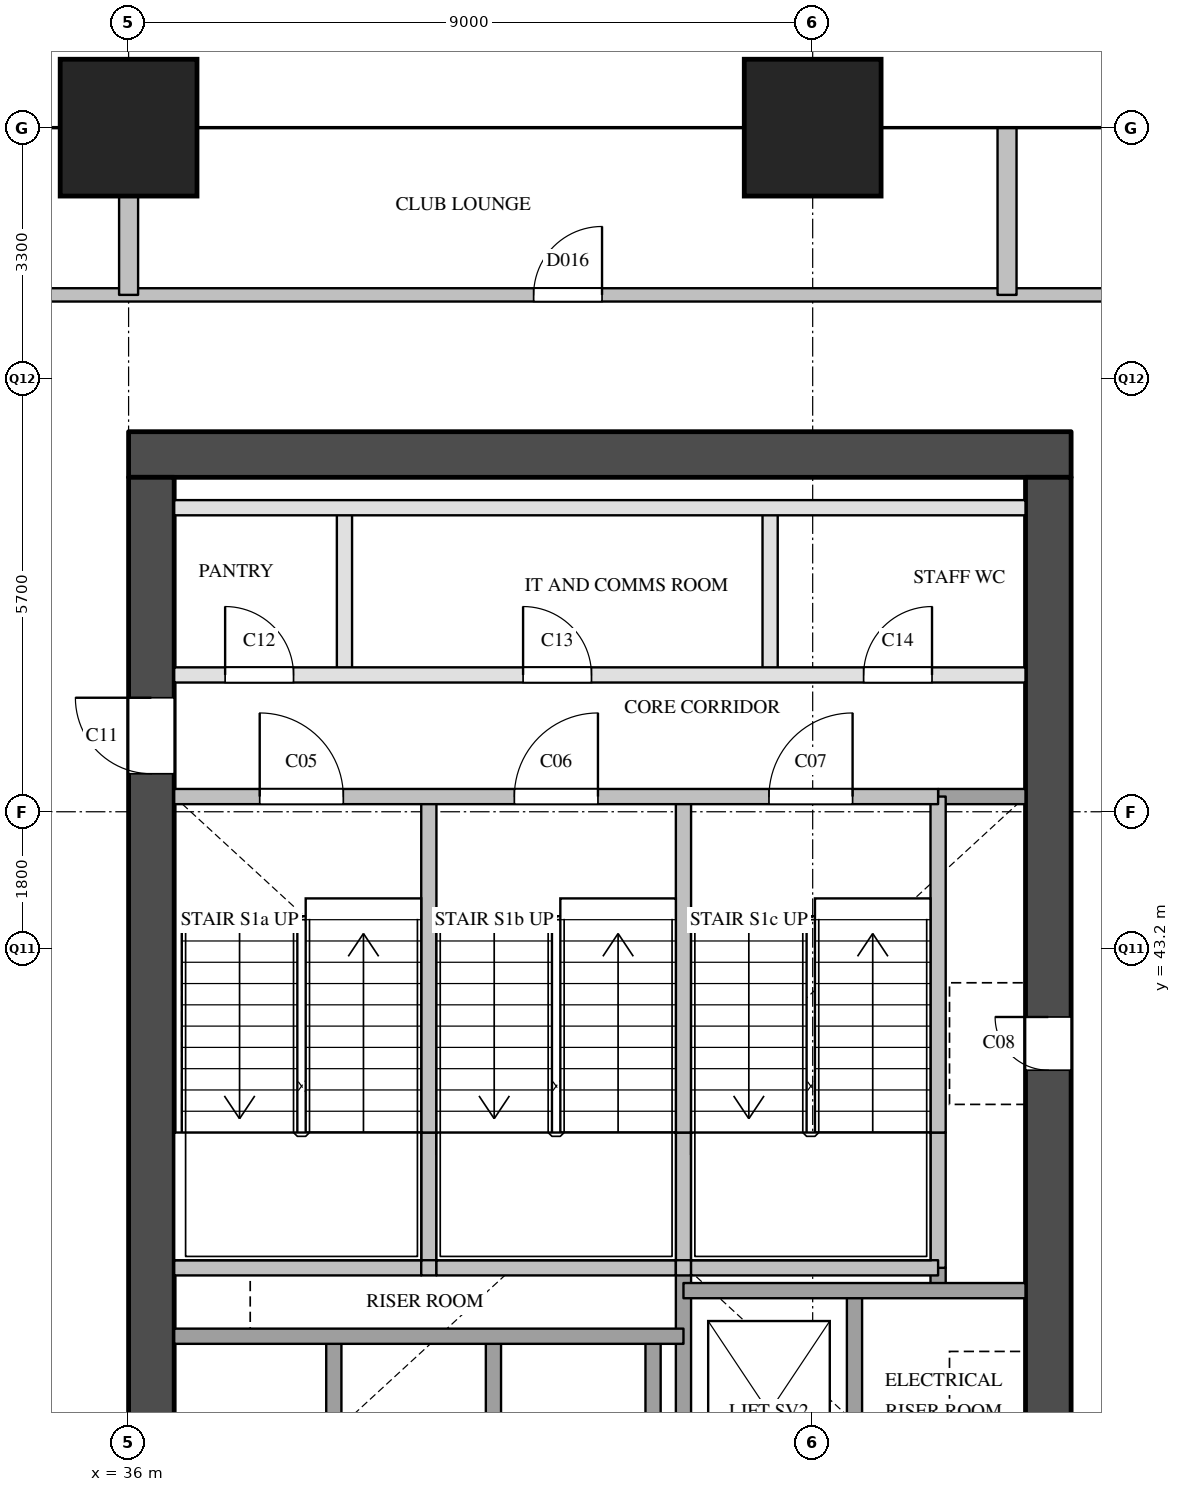
"""IFC4 building model, lengths in metres.
Left out: names, types, materials, properties, quantities, classifications, styles, units other than length and angle.
Written with IfcOpenShell. Run it as: python <this file> out.ifc"""

import sys

from ifc_helpers import new_model, si_unit, direction, frame, frame_2d, origin, origin_2d, place, context, subcontext, project, spatial, rectangle, extrude, element, fill, save


model = new_model("IFC4")
c1 = context("Model", 3, precision=1e-05, world=origin(), true_north=direction((0.0, 1.0)))
c2 = subcontext(c1, "Body", "Model", "MODEL_VIEW")
j1 = project(units=[si_unit("LENGTHUNIT", "METRE"), si_unit("PLANEANGLEUNIT", "RADIAN")], contexts=[c1])
p1 = place(None, origin())
s1 = spatial("IfcSite", under=j1, at=p1, CompositionType="ELEMENT")
p2 = place(p1, origin())
s2 = spatial("IfcBuilding", under=s1, at=p2, CompositionType="ELEMENT")
p3 = place(p2, frame((0.0, 0.0, 77.8)))
s3 = spatial("IfcBuildingStorey", under=s2, at=p3, CompositionType="ELEMENT", Elevation=77.8)
for number, where, z_axis, x_axis in (
    (1, (36.0, 54.0, 0.0), (0.0, 0.0, 1.0), (1.0, 0.0, 0.0)),
    (2, (45.0, 54.0, 0.0), (0.0, 0.0, 1.0), (1.0, 0.0, 0.0)),
):
    element("IfcColumn", number, at=place(p3, frame(where, z_axis=z_axis, x_axis=x_axis)), inside=s3, PredefinedType="COLUMN", context=c2, shape_type="SweptSolid", body=[
        extrude(rectangle(XDim=1.8, YDim=1.8, at=origin_2d()), origin(), (0.0, 0.0, 1.0), 3.8),
    ])
p4 = place(p3, frame((36.0, 49.7, 0.0), z_axis=(0.0, 0.0, 1.0), x_axis=(1.0, 0.0, 0.0)))
e3 = element("IfcWall", 3, at=p4, inside=s3, PredefinedType="SHEAR", context=c2, shape_type="SweptSolid", body=[
    extrude(rectangle(XDim=12.4, YDim=0.6, at=frame_2d((6.2, 0.0))), origin(), (0.0, 0.0, 1.0), 3.5),
])
p5 = place(p3, frame((36.3, 29.1, 0.0), z_axis=(0.0, 0.0, 1.0), x_axis=(0.0, 1.0, 0.0)))
e4 = element("IfcWall", 4, at=p5, inside=s3, PredefinedType="SHEAR", context=c2, shape_type="SweptSolid", body=[
    extrude(rectangle(XDim=20.3, YDim=0.6, at=frame_2d((10.15, 0.0))), origin(), (0.0, 0.0, 1.0), 3.5),
])
p6 = place(p5, frame((3.6, 0.0, 0.0)))
e5 = element("IfcOpeningElement", 5, at=p6, cuts=e4, PredefinedType="OPENING", context=c2, shape_type="SweptSolid", body=[
    extrude(rectangle(XDim=1.8, YDim=2.1, at=frame_2d((0.9, 1.05))), frame((0.0, 0.31, 0.0), z_axis=(0.0, -1.0, 0.0), x_axis=(1.0, 0.0, 0.0)), (0.0, 0.0, 1.0), 0.62),
])
p7 = place(p5, frame((16.4, 0.0, 0.0)))
e6 = element("IfcOpeningElement", 6, at=p7, cuts=e4, PredefinedType="OPENING", context=c2, shape_type="SweptSolid", body=[
    extrude(rectangle(XDim=1.0, YDim=2.1, at=frame_2d((0.5, 1.05))), frame((0.0, 0.31, 0.0), z_axis=(0.0, -1.0, 0.0), x_axis=(1.0, 0.0, 0.0)), (0.0, 0.0, 1.0), 0.62),
])
p8 = place(p3, frame((48.1, 29.1, 0.0), z_axis=(0.0, 0.0, 1.0), x_axis=(0.0, 1.0, 0.0)))
e7 = element("IfcWall", 7, at=p8, inside=s3, PredefinedType="SHEAR", context=c2, shape_type="SweptSolid", body=[
    extrude(rectangle(XDim=20.3, YDim=0.6, at=frame_2d((10.15, 0.0))), origin(), (0.0, 0.0, 1.0), 3.5),
])
p9 = place(p8, frame((12.5, 0.0, 0.0)))
e8 = element("IfcOpeningElement", 8, at=p9, cuts=e7, PredefinedType="OPENING", context=c2, shape_type="SweptSolid", body=[
    extrude(rectangle(XDim=0.7, YDim=2.1, at=frame_2d((0.35, 1.05))), frame((0.0, 0.31, 0.0), z_axis=(0.0, -1.0, 0.0), x_axis=(1.0, 0.0, 0.0)), (0.0, 0.0, 1.0), 0.62),
])
p10 = place(p8, frame((3.9, 0.0, 0.0)))
e9 = element("IfcOpeningElement", 9, at=p10, cuts=e7, PredefinedType="OPENING", context=c2, shape_type="SweptSolid", body=[
    extrude(rectangle(XDim=1.8, YDim=2.1, at=frame_2d((0.9, 1.05))), frame((0.0, 0.31, 0.0), z_axis=(0.0, -1.0, 0.0), x_axis=(1.0, 0.0, 0.0)), (0.0, 0.0, 1.0), 0.62),
])
p11 = place(p3, frame((38.7, 34.9, 0.0), z_axis=(0.0, 0.0, 1.0), x_axis=(0.0, 1.0, 0.0)))
e10 = element("IfcWall", 10, at=p11, inside=s3, PredefinedType="SOLIDWALL", context=c2, shape_type="SweptSolid", body=[
    extrude(rectangle(XDim=3.2, YDim=0.2, at=frame_2d((1.6, 0.0))), origin(), (0.0, 0.0, 1.0), 3.5),
])
p12 = place(p3, frame((38.84, 46.8, 0.0), z_axis=(0.0, 0.0, 1.0), x_axis=(0.0, 1.0, 0.0)))
e11 = element("IfcWall", 11, at=p12, inside=s3, PredefinedType="PARTITIONING", context=c2, shape_type="SweptSolid", body=[
    extrude(rectangle(XDim=2.2, YDim=0.2, at=frame_2d((1.1, 0.0))), origin(), (0.0, 0.0, 1.0), 3.5),
])
p13 = place(p3, frame((39.95, 39.0, 0.0), z_axis=(0.0, 0.0, 1.0), x_axis=(0.0, 1.0, 0.0)))
e12 = element("IfcWall", 12, at=p13, inside=s3, PredefinedType="SOLIDWALL", context=c2, shape_type="SweptSolid", body=[
    extrude(rectangle(XDim=1.78, YDim=0.2, at=frame_2d((0.89, 0.0))), origin(), (0.0, 0.0, 1.0), 3.5),
])
p14 = place(p3, frame((39.95, 40.78, 0.0), z_axis=(0.0, 0.0, 1.0), x_axis=(0.0, 1.0, 0.0)))
e13 = element("IfcWall", 13, at=p14, inside=s3, PredefinedType="SOLIDWALL", context=c2, shape_type="SweptSolid", body=[
    extrude(rectangle(XDim=4.42, YDim=0.2, at=frame_2d((2.21, 0.0))), origin(), (0.0, 0.0, 1.0), 3.5),
])
for number, where, z_axis, x_axis in (
    (14, (40.8, 34.9, 0.0), (0.0, 0.0, 1.0), (0.0, 1.0, 0.0)),
    (15, (42.9, 34.9, 0.0), (0.0, 0.0, 1.0), (0.0, 1.0, 0.0)),
):
    element("IfcWall", number, at=place(p3, frame(where, z_axis=z_axis, x_axis=x_axis)), inside=s3, PredefinedType="SOLIDWALL", context=c2, shape_type="SweptSolid", body=[
        extrude(rectangle(XDim=3.2, YDim=0.2, at=frame_2d((1.6, 0.0))), origin(), (0.0, 0.0, 1.0), 3.5),
    ])
p15 = place(p3, frame((43.3, 29.1, 0.0), z_axis=(0.0, 0.0, 1.0), x_axis=(0.0, 1.0, 0.0)))
e16 = element("IfcWall", 16, at=p15, inside=s3, PredefinedType="SOLIDWALL", context=c2, shape_type="SweptSolid", body=[
    extrude(rectangle(XDim=9.9, YDim=0.2, at=frame_2d((4.95, 0.0))), origin(), (0.0, 0.0, 1.0), 3.5),
])
p16 = place(p3, frame((43.3, 39.0, 0.0), z_axis=(0.0, 0.0, 1.0), x_axis=(0.0, 1.0, 0.0)))
e17 = element("IfcWall", 17, at=p16, inside=s3, PredefinedType="SOLIDWALL", context=c2, shape_type="SweptSolid", body=[
    extrude(rectangle(XDim=1.78, YDim=0.2, at=frame_2d((0.89, 0.0))), origin(), (0.0, 0.0, 1.0), 3.5),
])
p17 = place(p3, frame((43.3, 40.78, 0.0), z_axis=(0.0, 0.0, 1.0), x_axis=(0.0, 1.0, 0.0)))
e18 = element("IfcWall", 18, at=p17, inside=s3, PredefinedType="SOLIDWALL", context=c2, shape_type="SweptSolid", body=[
    extrude(rectangle(XDim=4.42, YDim=0.2, at=frame_2d((2.21, 0.0))), origin(), (0.0, 0.0, 1.0), 3.5),
])
p18 = place(p3, frame((44.44, 46.8, 0.0), z_axis=(0.0, 0.0, 1.0), x_axis=(0.0, 1.0, 0.0)))
e19 = element("IfcWall", 19, at=p18, inside=s3, PredefinedType="PARTITIONING", context=c2, shape_type="SweptSolid", body=[
    extrude(rectangle(XDim=2.2, YDim=0.2, at=frame_2d((1.1, 0.0))), origin(), (0.0, 0.0, 1.0), 3.5),
])
p19 = place(p3, frame((45.55, 35.5, 0.0), z_axis=(0.0, 0.0, 1.0), x_axis=(0.0, 1.0, 0.0)))
e20 = element("IfcWall", 20, at=p19, inside=s3, PredefinedType="SOLIDWALL", context=c2, shape_type="SweptSolid", body=[
    extrude(rectangle(XDim=3.2, YDim=0.2, at=frame_2d((1.6, 0.0))), origin(), (0.0, 0.0, 1.0), 3.5),
])
p20 = place(p3, frame((46.65, 38.7, 0.0), z_axis=(0.0, 0.0, 1.0), x_axis=(0.0, 1.0, 0.0)))
e21 = element("IfcWall", 21, at=p20, inside=s3, PredefinedType="SOLIDWALL", context=c2, shape_type="SweptSolid", body=[
    extrude(rectangle(XDim=0.3, YDim=0.2, at=frame_2d((0.15, 0.0))), origin(), (0.0, 0.0, 1.0), 3.5),
])
p21 = place(p3, frame((46.65, 39.0, 0.0), z_axis=(0.0, 0.0, 1.0), x_axis=(0.0, 1.0, 0.0)))
e22 = element("IfcWall", 22, at=p21, inside=s3, PredefinedType="SOLIDWALL", context=c2, shape_type="SweptSolid", body=[
    extrude(rectangle(XDim=1.78, YDim=0.2, at=frame_2d((0.89, 0.0))), origin(), (0.0, 0.0, 1.0), 3.5),
])
p22 = place(p3, frame((46.65, 40.78, 0.0), z_axis=(0.0, 0.0, 1.0), x_axis=(0.0, 1.0, 0.0)))
e23 = element("IfcWall", 23, at=p22, inside=s3, PredefinedType="SOLIDWALL", context=c2, shape_type="SweptSolid", body=[
    extrude(rectangle(XDim=4.42, YDim=0.2, at=frame_2d((2.21, 0.0))), origin(), (0.0, 0.0, 1.0), 3.5),
])
p23 = place(p3, frame((36.6, 38.1, 0.0), z_axis=(0.0, 0.0, 1.0), x_axis=(1.0, 0.0, 0.0)))
e24 = element("IfcWall", 24, at=p23, inside=s3, PredefinedType="SOLIDWALL", context=c2, shape_type="SweptSolid", body=[
    extrude(rectangle(XDim=6.7, YDim=0.2, at=frame_2d((3.35, 0.0))), origin(), (0.0, 0.0, 1.0), 3.5),
])
p24 = place(p3, frame((43.3, 38.7, 0.0), z_axis=(0.0, 0.0, 1.0), x_axis=(1.0, 0.0, 0.0)))
e25 = element("IfcWall", 25, at=p24, inside=s3, PredefinedType="SOLIDWALL", context=c2, shape_type="SweptSolid", body=[
    extrude(rectangle(XDim=4.5, YDim=0.2, at=frame_2d((2.25, 0.0))), origin(), (0.0, 0.0, 1.0), 3.5),
])
p25 = place(p3, frame((36.6, 39.0, 0.0), z_axis=(0.0, 0.0, 1.0), x_axis=(1.0, 0.0, 0.0)))
e26 = element("IfcWall", 26, at=p25, inside=s3, PredefinedType="SOLIDWALL", context=c2, shape_type="SweptSolid", body=[
    extrude(rectangle(XDim=3.25, YDim=0.2, at=frame_2d((1.625, 0.0))), origin(), (0.0, 0.0, 1.0), 3.5),
])
p26 = place(p3, frame((39.85, 39.0, 0.0), z_axis=(0.0, 0.0, 1.0), x_axis=(1.0, 0.0, 0.0)))
e27 = element("IfcWall", 27, at=p26, inside=s3, PredefinedType="SOLIDWALL", context=c2, shape_type="SweptSolid", body=[
    extrude(rectangle(XDim=0.2, YDim=0.2, at=frame_2d((0.1, 0.0))), origin(), (0.0, 0.0, 1.0), 3.5),
])
p27 = place(p3, frame((40.05, 39.0, 0.0), z_axis=(0.0, 0.0, 1.0), x_axis=(1.0, 0.0, 0.0)))
e28 = element("IfcWall", 28, at=p27, inside=s3, PredefinedType="SOLIDWALL", context=c2, shape_type="SweptSolid", body=[
    extrude(rectangle(XDim=3.15, YDim=0.2, at=frame_2d((1.575, 0.0))), origin(), (0.0, 0.0, 1.0), 3.5),
])
p28 = place(p3, frame((43.2, 39.0, 0.0), z_axis=(0.0, 0.0, 1.0), x_axis=(1.0, 0.0, 0.0)))
e29 = element("IfcWall", 29, at=p28, inside=s3, PredefinedType="SOLIDWALL", context=c2, shape_type="SweptSolid", body=[
    extrude(rectangle(XDim=0.2, YDim=0.2, at=frame_2d((0.1, 0.0))), origin(), (0.0, 0.0, 1.0), 3.5),
])
p29 = place(p3, frame((43.4, 39.0, 0.0), z_axis=(0.0, 0.0, 1.0), x_axis=(1.0, 0.0, 0.0)))
e30 = element("IfcWall", 30, at=p29, inside=s3, PredefinedType="SOLIDWALL", context=c2, shape_type="SweptSolid", body=[
    extrude(rectangle(XDim=3.25, YDim=0.2, at=frame_2d((1.625, 0.0))), origin(), (0.0, 0.0, 1.0), 3.5),
])
p30 = place(p3, frame((46.65, 45.2, 0.0), z_axis=(0.0, 0.0, 1.0), x_axis=(1.0, 0.0, 0.0)))
e31 = element("IfcWall", 31, at=p30, inside=s3, PredefinedType="SOLIDWALL", context=c2, shape_type="SweptSolid", body=[
    extrude(rectangle(XDim=1.15, YDim=0.2, at=frame_2d((0.575, 0.0))), origin(), (0.0, 0.0, 1.0), 3.5),
])
p31 = place(p3, frame((36.6, 45.2, 0.0), z_axis=(0.0, 0.0, 1.0), x_axis=(1.0, 0.0, 0.0)))
e32 = element("IfcWall", 32, at=p31, inside=s3, PredefinedType="SOLIDWALL", context=c2, shape_type="SweptSolid", body=[
    extrude(rectangle(XDim=10.05, YDim=0.2, at=frame_2d((5.025, 0.0))), origin(), (0.0, 0.0, 1.0), 3.5),
])
p32 = place(p31, frame((1.125, 0.0, 0.0)))
e33 = element("IfcOpeningElement", 33, at=p32, cuts=e32, PredefinedType="OPENING", context=c2, shape_type="SweptSolid", body=[
    extrude(rectangle(XDim=1.1, YDim=2.1, at=frame_2d((0.55, 1.05))), frame((0.0, 0.11, 0.0), z_axis=(0.0, -1.0, 0.0), x_axis=(1.0, 0.0, 0.0)), (0.0, 0.0, 1.0), 0.22),
])
p33 = place(p31, frame((4.475, 0.0, 0.0)))
e34 = element("IfcOpeningElement", 34, at=p33, cuts=e32, PredefinedType="OPENING", context=c2, shape_type="SweptSolid", body=[
    extrude(rectangle(XDim=1.1, YDim=2.1, at=frame_2d((0.55, 1.05))), frame((0.0, 0.11, 0.0), z_axis=(0.0, -1.0, 0.0), x_axis=(1.0, 0.0, 0.0)), (0.0, 0.0, 1.0), 0.22),
])
p34 = place(p31, frame((7.825, 0.0, 0.0)))
e35 = element("IfcOpeningElement", 35, at=p34, cuts=e32, PredefinedType="OPENING", context=c2, shape_type="SweptSolid", body=[
    extrude(rectangle(XDim=1.1, YDim=2.1, at=frame_2d((0.55, 1.05))), frame((0.0, 0.11, 0.0), z_axis=(0.0, -1.0, 0.0), x_axis=(1.0, 0.0, 0.0)), (0.0, 0.0, 1.0), 0.22),
])
p35 = place(p3, frame((36.6, 46.8, 0.0), z_axis=(0.0, 0.0, 1.0), x_axis=(1.0, 0.0, 0.0)))
e36 = element("IfcWall", 36, at=p35, inside=s3, PredefinedType="PARTITIONING", context=c2, shape_type="SweptSolid", body=[
    extrude(rectangle(XDim=11.2, YDim=0.2, at=frame_2d((5.6, 0.0))), origin(), (0.0, 0.0, 1.0), 3.5),
])
p36 = place(p35, frame((0.67, 0.0, 0.0)))
e37 = element("IfcOpeningElement", 37, at=p36, cuts=e36, PredefinedType="OPENING", context=c2, shape_type="SweptSolid", body=[
    extrude(rectangle(XDim=0.9, YDim=2.1, at=frame_2d((0.45, 1.05))), frame((0.0, 0.11, 0.0), z_axis=(0.0, -1.0, 0.0), x_axis=(1.0, 0.0, 0.0)), (0.0, 0.0, 1.0), 0.22),
])
p37 = place(p35, frame((4.59, 0.0, 0.0)))
e38 = element("IfcOpeningElement", 38, at=p37, cuts=e36, PredefinedType="OPENING", context=c2, shape_type="SweptSolid", body=[
    extrude(rectangle(XDim=0.9, YDim=2.1, at=frame_2d((0.45, 1.05))), frame((0.0, 0.11, 0.0), z_axis=(0.0, -1.0, 0.0), x_axis=(1.0, 0.0, 0.0)), (0.0, 0.0, 1.0), 0.22),
])
p38 = place(p35, frame((9.07, 0.0, 0.0)))
e39 = element("IfcOpeningElement", 39, at=p38, cuts=e36, PredefinedType="OPENING", context=c2, shape_type="SweptSolid", body=[
    extrude(rectangle(XDim=0.9, YDim=2.1, at=frame_2d((0.45, 1.05))), frame((0.0, 0.11, 0.0), z_axis=(0.0, -1.0, 0.0), x_axis=(1.0, 0.0, 0.0)), (0.0, 0.0, 1.0), 0.22),
])
p39 = place(p3, frame((36.6, 49.0, 0.0), z_axis=(0.0, 0.0, 1.0), x_axis=(1.0, 0.0, 0.0)))
e40 = element("IfcWall", 40, at=p39, inside=s3, PredefinedType="PARTITIONING", context=c2, shape_type="SweptSolid", body=[
    extrude(rectangle(XDim=11.2, YDim=0.2, at=frame_2d((5.6, 0.0))), origin(), (0.0, 0.0, 1.0), 3.5),
])
p40 = place(p3, frame((34.2, 51.8, 0.0), z_axis=(0.0, 0.0, 1.0), x_axis=(1.0, 0.0, 0.0)))
e41 = element("IfcWall", 41, at=p40, inside=s3, PredefinedType="PARTITIONING", context=c2, shape_type="SweptSolid", body=[
    extrude(rectangle(XDim=16.0, YDim=0.175, at=frame_2d((8.0, 0.0))), origin(), (0.0, 0.0, 1.0), 3.5),
])
p41 = place(p40, frame((7.129, 0.0, 0.0)))
e42 = element("IfcOpeningElement", 42, at=p41, cuts=e41, PredefinedType="OPENING", context=c2, shape_type="SweptSolid", body=[
    extrude(rectangle(XDim=0.9, YDim=2.1, at=frame_2d((0.45, 1.05))), frame((0.0, 0.097, 0.0), z_axis=(0.0, -1.0, 0.0), x_axis=(1.0, 0.0, 0.0)), (0.0, 0.0, 1.0), 0.195),
])
p42 = place(p3, frame((36.0, 51.8, 0.0), z_axis=(0.0, 0.0, 1.0), x_axis=(0.0, 1.0, 0.0)))
e43 = element("IfcWall", 43, at=p42, inside=s3, PredefinedType="PARTITIONING", context=c2, shape_type="SweptSolid", body=[
    extrude(rectangle(XDim=2.2, YDim=0.25, at=frame_2d((1.1, 0.0))), origin(), (0.0, 0.0, 1.0), 3.5),
])
p43 = place(p3, frame((47.557, 51.8, 0.0), z_axis=(0.0, 0.0, 1.0), x_axis=(0.0, 1.0, 0.0)))
e44 = element("IfcWall", 44, at=p43, inside=s3, PredefinedType="PARTITIONING", context=c2, shape_type="SweptSolid", body=[
    extrude(rectangle(XDim=2.2, YDim=0.25, at=frame_2d((1.1, 0.0))), origin(), (0.0, 0.0, 1.0), 2.5),
])
p44 = place(p32, origin())
e45 = element("IfcDoor", 45, at=p44, inside=s3, OperationType="SINGLE_SWING_LEFT", PredefinedType="DOOR", context=c2, shape_type="SweptSolid", body=[
    extrude(rectangle(XDim=1.1, YDim=2.1, at=frame_2d((0.55, 1.05))), frame((0.0, 0.025, 0.0), z_axis=(0.0, -1.0, 0.0), x_axis=(1.0, 0.0, 0.0)), (0.0, 0.0, 1.0), 0.05),
])
fill(e33, e45)
p45 = place(p33, origin())
e46 = element("IfcDoor", 46, at=p45, inside=s3, OperationType="SINGLE_SWING_RIGHT", PredefinedType="DOOR", context=c2, shape_type="SweptSolid", body=[
    extrude(rectangle(XDim=1.1, YDim=2.1, at=frame_2d((0.55, 1.05))), frame((0.0, 0.025, 0.0), z_axis=(0.0, -1.0, 0.0), x_axis=(1.0, 0.0, 0.0)), (0.0, 0.0, 1.0), 0.05),
])
fill(e34, e46)
p46 = place(p34, origin())
e47 = element("IfcDoor", 47, at=p46, inside=s3, OperationType="SINGLE_SWING_RIGHT", PredefinedType="DOOR", context=c2, shape_type="SweptSolid", body=[
    extrude(rectangle(XDim=1.1, YDim=2.1, at=frame_2d((0.55, 1.05))), frame((0.0, 0.025, 0.0), z_axis=(0.0, -1.0, 0.0), x_axis=(1.0, 0.0, 0.0)), (0.0, 0.0, 1.0), 0.05),
])
fill(e35, e47)
p47 = place(p9, origin())
e48 = element("IfcDoor", 48, at=p47, inside=s3, OperationType="SINGLE_SWING_RIGHT", PredefinedType="DOOR", context=c2, shape_type="SweptSolid", body=[
    extrude(rectangle(XDim=0.7, YDim=2.1, at=frame_2d((0.35, 1.05))), frame((0.0, 0.025, 0.0), z_axis=(0.0, -1.0, 0.0), x_axis=(1.0, 0.0, 0.0)), (0.0, 0.0, 1.0), 0.05),
])
fill(e8, e48)
p48 = place(p7, origin())
e49 = element("IfcDoor", 49, at=p48, inside=s3, OperationType="SINGLE_SWING_RIGHT", PredefinedType="DOOR", context=c2, shape_type="SweptSolid", body=[
    extrude(rectangle(XDim=1.0, YDim=2.1, at=frame_2d((0.5, 1.05))), frame((0.0, 0.025, 0.0), z_axis=(0.0, -1.0, 0.0), x_axis=(1.0, 0.0, 0.0)), (0.0, 0.0, 1.0), 0.05),
])
fill(e6, e49)
p49 = place(p36, origin())
e50 = element("IfcDoor", 50, at=p49, inside=s3, OperationType="SINGLE_SWING_LEFT", PredefinedType="DOOR", context=c2, shape_type="SweptSolid", body=[
    extrude(rectangle(XDim=0.9, YDim=2.1, at=frame_2d((0.45, 1.05))), frame((0.0, 0.025, 0.0), z_axis=(0.0, -1.0, 0.0), x_axis=(1.0, 0.0, 0.0)), (0.0, 0.0, 1.0), 0.05),
])
fill(e37, e50)
p50 = place(p37, origin())
e51 = element("IfcDoor", 51, at=p50, inside=s3, OperationType="SINGLE_SWING_LEFT", PredefinedType="DOOR", context=c2, shape_type="SweptSolid", body=[
    extrude(rectangle(XDim=0.9, YDim=2.1, at=frame_2d((0.45, 1.05))), frame((0.0, 0.025, 0.0), z_axis=(0.0, -1.0, 0.0), x_axis=(1.0, 0.0, 0.0)), (0.0, 0.0, 1.0), 0.05),
])
fill(e38, e51)
p51 = place(p38, origin())
e52 = element("IfcDoor", 52, at=p51, inside=s3, OperationType="SINGLE_SWING_RIGHT", PredefinedType="DOOR", context=c2, shape_type="SweptSolid", body=[
    extrude(rectangle(XDim=0.9, YDim=2.1, at=frame_2d((0.45, 1.05))), frame((0.0, 0.025, 0.0), z_axis=(0.0, -1.0, 0.0), x_axis=(1.0, 0.0, 0.0)), (0.0, 0.0, 1.0), 0.05),
])
fill(e39, e52)
p52 = place(p41, origin())
e53 = element("IfcDoor", 53, at=p52, inside=s3, OperationType="SINGLE_SWING_RIGHT", PredefinedType="DOOR", context=c2, shape_type="SweptSolid", body=[
    extrude(rectangle(XDim=0.9, YDim=2.1, at=frame_2d((0.45, 1.05))), frame((0.0, 0.025, 0.0), z_axis=(0.0, -1.0, 0.0), x_axis=(1.0, 0.0, 0.0)), (0.0, 0.0, 1.0), 0.05),
])
fill(e42, e53)
save(model, sys.argv[1])
